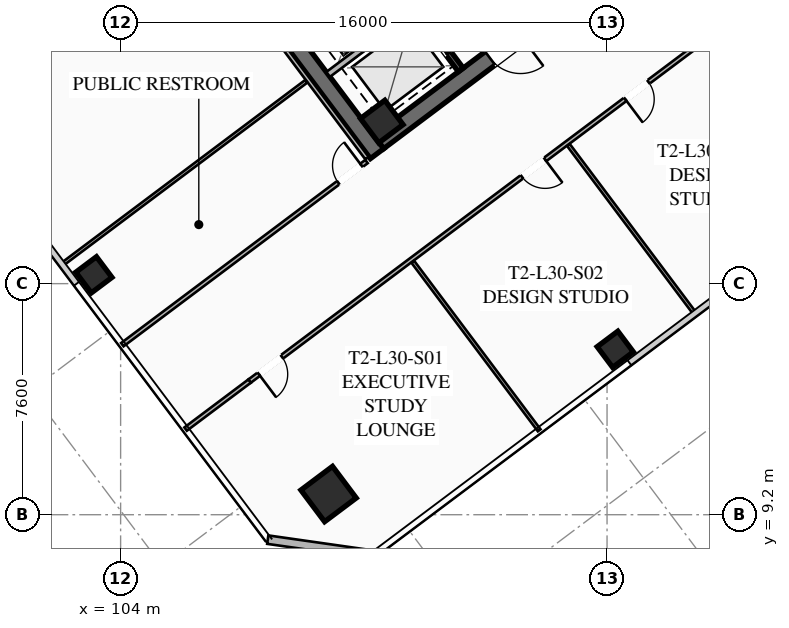
"""IFC4 building model, lengths in metres.
Left out: names, types, materials, properties, quantities, classifications, styles, units other than length and angle.
Written with IfcOpenShell. Run it as: python <this file> out.ifc"""

import sys

from ifc_helpers import new_model, si_unit, direction, frame, frame_2d, origin, origin_2d, place, context, subcontext, project, spatial, rectangle, hollow_rectangle, extrude, element, fill, save


model = new_model("IFC4")
c1 = context("Model", 3, precision=1e-05, world=origin(), true_north=direction((0.0, 1.0)))
c2 = subcontext(c1, "Body", "Model", "MODEL_VIEW")
j1 = project(units=[si_unit("LENGTHUNIT", "METRE"), si_unit("PLANEANGLEUNIT", "RADIAN")], contexts=[c1])
p1 = place(None, origin())
s1 = spatial("IfcSite", under=j1, at=p1, CompositionType="ELEMENT")
p2 = place(p1, origin())
s2 = spatial("IfcBuilding", under=s1, at=p2, CompositionType="ELEMENT")
p3 = place(p2, frame((0.0, 0.0, 114.4)))
s3 = spatial("IfcBuildingStorey", under=s2, at=p3, CompositionType="ELEMENT", Elevation=114.4)
p4 = place(p3, frame((112.436, 21.077, 0.0), z_axis=(0.0, 0.0, 1.0), x_axis=(-0.600005007985, 0.799996243986, 0.0)))
e1 = element("IfcWall", 1, at=p4, inside=s3, PredefinedType="SHEAR", context=c2, shape_type="SweptSolid", body=[
    extrude(rectangle(XDim=15.6, YDim=0.55, at=frame_2d((7.8, 0.0))), origin(), (0.0, 0.0, 1.0), 3.55),
])
p5 = place(p3, frame((124.539, 30.498, 0.0), z_axis=(0.0, 0.0, 1.0), x_axis=(-0.799998054672, -0.600002593761, 0.0)))
e2 = element("IfcWall", 2, at=p5, inside=s3, PredefinedType="SHEAR", context=c2, shape_type="SweptSolid", body=[
    extrude(rectangle(XDim=15.06, YDim=0.55, at=frame_2d((7.53, 0.0))), origin(), (0.0, 0.0, 1.0), 3.55),
])
p6 = place(p5, frame((9.23, 0.0, 0.0)))
e3 = element("IfcOpeningElement", 3, at=p6, cuts=e2, PredefinedType="OPENING", context=c2, shape_type="SweptSolid", body=[
    extrude(rectangle(XDim=1.25, YDim=2.25, at=frame_2d((0.625, 1.125))), frame((0.0, 0.285, 0.0), z_axis=(0.0, -1.0, 0.0), x_axis=(1.0, 0.0, 0.0)), (0.0, 0.0, 1.0), 0.57),
])
p7 = place(p5, frame((4.18, 0.0, 0.0)))
e4 = element("IfcOpeningElement", 4, at=p7, cuts=e2, PredefinedType="OPENING", context=c2, shape_type="SweptSolid", body=[
    extrude(rectangle(XDim=1.25, YDim=2.25, at=frame_2d((0.625, 1.125))), frame((0.0, 0.285, 0.0), z_axis=(0.0, -1.0, 0.0), x_axis=(1.0, 0.0, 0.0)), (0.0, 0.0, 1.0), 0.57),
])
p8 = place(p3, frame((112.59, 22.13, 0.0), z_axis=(0.0, 0.0, 1.0), x_axis=(0.799999996291, 0.600000004945, 0.0)))
e5 = element("IfcColumn", 5, at=p8, inside=s3, PredefinedType="COLUMN", context=c2, shape_type="SweptSolid", body=[
    extrude(hollow_rectangle(XDim=1.0, YDim=1.0, WallThickness=0.04, at=origin_2d()), origin(), (0.0, 0.0, 1.0), 3.37),
])
p9 = place(p3, frame((110.84, 9.88, 0.0), z_axis=(0.0, 0.0, 1.0), x_axis=(0.799999996291, 0.600000004945, 0.0)))
e6 = element("IfcColumn", 6, at=p9, inside=s3, PredefinedType="COLUMN", context=c2, shape_type="SweptSolid", body=[
    extrude(hollow_rectangle(XDim=1.3, YDim=1.3, WallThickness=0.05, at=origin_2d()), origin(), (0.0, 0.0, 1.0), 3.37),
])
for number, where, z_axis, x_axis in (
    (7, (120.27, 14.64, 0.0), (0.0, 0.0, 1.0), (0.8, 0.6, 0.0)),
    (8, (103.12, 17.09, 0.0), (0.0, 0.0, 1.0), (0.8, 0.6, 0.0)),
):
    element("IfcColumn", number, at=place(p3, frame(where, z_axis=z_axis, x_axis=x_axis)), inside=s3, PredefinedType="COLUMN", context=c2, shape_type="SweptSolid", body=[
        extrude(hollow_rectangle(XDim=0.85, YDim=0.85, WallThickness=0.035, at=origin_2d()), origin(), (0.0, 0.0, 1.0), 3.37),
    ])
p10 = place(p3, frame((112.34, 7.88, 0.0), z_axis=(0.0, 0.0, 1.0), x_axis=(-0.989949493661, 0.141421356237, 0.0)))
e9 = element("IfcWall", 9, at=p10, inside=s3, PredefinedType="SOLIDWALL", context=c2, shape_type="SweptSolid", body=[
    extrude(rectangle(XDim=3.536, YDim=0.28, at=frame_2d((1.768, 0.0))), origin(), (0.0, 0.0, 1.0), 3.37),
])
p11 = place(p3, frame((115.19, 23.83, 0.0), z_axis=(0.0, 0.0, 1.0), x_axis=(-0.599993943644, 0.800004542231, 0.0)))
e10 = element("IfcWall", 10, at=p11, inside=s3, PredefinedType="SHEAR", context=c2, shape_type="SweptSolid", body=[
    extrude(rectangle(XDim=6.45, YDim=0.2, at=frame_2d((3.225, 0.0))), origin(), (0.0, 0.0, 1.0), 3.37),
])
p12 = place(p11, frame((4.875, 0.0, 0.0)))
e11 = element("IfcOpeningElement", 11, at=p12, cuts=e10, PredefinedType="OPENING", context=c2, shape_type="SweptSolid", body=[
    extrude(rectangle(XDim=1.3, YDim=2.25, at=frame_2d((0.65, 1.125))), frame((0.0, 0.11, 0.0), z_axis=(0.0, -1.0, 0.0), x_axis=(1.0, 0.0, 0.0)), (0.0, 0.0, 1.0), 0.22),
])
p13 = place(p11, frame((2.875, 0.0, 0.0)))
e12 = element("IfcOpeningElement", 12, at=p13, cuts=e10, PredefinedType="OPENING", context=c2, shape_type="SweptSolid", body=[
    extrude(rectangle(XDim=1.3, YDim=2.25, at=frame_2d((0.65, 1.125))), frame((0.0, 0.11, 0.0), z_axis=(0.0, -1.0, 0.0), x_axis=(1.0, 0.0, 0.0)), (0.0, 0.0, 1.0), 0.22),
])
p14 = place(p11, frame((0.675, 0.0, 0.0)))
e13 = element("IfcOpeningElement", 13, at=p14, cuts=e10, PredefinedType="OPENING", context=c2, shape_type="SweptSolid", body=[
    extrude(rectangle(XDim=1.3, YDim=2.25, at=frame_2d((0.65, 1.125))), frame((0.0, 0.11, 0.0), z_axis=(0.0, -1.0, 0.0), x_axis=(1.0, 0.0, 0.0)), (0.0, 0.0, 1.0), 0.22),
])
p15 = place(p3, frame((110.826, 23.682, 0.0), z_axis=(0.0, 0.0, 1.0), x_axis=(0.8, 0.6, 0.0)))
e14 = element("IfcWall", 14, at=p15, inside=s3, PredefinedType="SOLIDWALL", context=c2, shape_type="SweptSolid", body=[
    extrude(rectangle(XDim=3.48, YDim=0.2, at=frame_2d((1.74, 0.0))), origin(), (0.0, 0.0, 1.0), 3.37),
])
p16 = place(p3, frame((133.282, 32.374, 0.0), z_axis=(0.0, 0.0, 1.0), x_axis=(-0.8, -0.6, 0.0)))
e15 = element("IfcWall", 15, at=p16, inside=s3, PredefinedType="PARTITIONING", context=c2, shape_type="SweptSolid", body=[
    extrude(rectangle(XDim=31.3, YDim=0.135, at=frame_2d((15.65, 0.0))), origin(), (0.0, 0.0, 1.0), 2.723),
])
p17 = place(p16, frame((29.97, 0.0, 0.0)))
e16 = element("IfcOpeningElement", 16, at=p17, cuts=e15, PredefinedType="OPENING", context=c2, shape_type="SweptSolid", body=[
    extrude(rectangle(XDim=0.95, YDim=2.05, at=frame_2d((0.475, 1.025))), frame((0.0, 0.077, 0.0), z_axis=(0.0, -1.0, 0.0), x_axis=(1.0, 0.0, 0.0)), (0.0, 0.0, 1.0), 0.155),
])
p18 = place(p16, frame((19.151, 0.0, 0.0)))
e17 = element("IfcOpeningElement", 17, at=p18, cuts=e15, PredefinedType="OPENING", context=c2, shape_type="SweptSolid", body=[
    extrude(rectangle(XDim=0.95, YDim=2.05, at=frame_2d((0.475, 1.025))), frame((0.0, 0.077, 0.0), z_axis=(0.0, -1.0, 0.0), x_axis=(1.0, 0.0, 0.0)), (0.0, 0.0, 1.0), 0.155),
])
p19 = place(p16, frame((14.901, 0.0, 0.0)))
e18 = element("IfcOpeningElement", 18, at=p19, cuts=e15, PredefinedType="OPENING", context=c2, shape_type="SweptSolid", body=[
    extrude(rectangle(XDim=0.95, YDim=2.05, at=frame_2d((0.475, 1.025))), frame((0.0, 0.077, 0.0), z_axis=(0.0, -1.0, 0.0), x_axis=(1.0, 0.0, 0.0)), (0.0, 0.0, 1.0), 0.155),
])
p20 = place(p16, frame((10.92, 0.0, 0.0)))
e19 = element("IfcOpeningElement", 19, at=p20, cuts=e15, PredefinedType="OPENING", context=c2, shape_type="SweptSolid", body=[
    extrude(rectangle(XDim=0.95, YDim=2.05, at=frame_2d((0.475, 1.025))), frame((0.0, 0.077, 0.0), z_axis=(0.0, -1.0, 0.0), x_axis=(1.0, 0.0, 0.0)), (0.0, 0.0, 1.0), 0.155),
])
p21 = place(p16, frame((0.38, 0.0, 0.0)))
e20 = element("IfcOpeningElement", 20, at=p21, cuts=e15, PredefinedType="OPENING", context=c2, shape_type="SweptSolid", body=[
    extrude(rectangle(XDim=0.95, YDim=2.05, at=frame_2d((0.475, 1.025))), frame((0.0, 0.077, 0.0), z_axis=(0.0, -1.0, 0.0), x_axis=(1.0, 0.0, 0.0)), (0.0, 0.0, 1.0), 0.155),
])
p22 = place(p3, frame((106.138, 12.016, 0.0), z_axis=(0.0, 0.0, 1.0), x_axis=(0.80002227902, 0.599970293491, 0.0)))
e21 = element("IfcWall", 21, at=p22, inside=s3, PredefinedType="PARTITIONING", context=c2, shape_type="SweptSolid", body=[
    extrude(rectangle(XDim=2.63, YDim=0.135, at=frame_2d((1.315, 0.0))), origin(), (0.0, 0.0, 1.0), 2.723),
])
p23 = place(p3, frame((117.768, 11.976, 0.0), z_axis=(0.0, 0.0, 1.0), x_axis=(-0.6, 0.8, 0.0)))
e22 = element("IfcWall", 22, at=p23, inside=s3, PredefinedType="PARTITIONING", context=c2, shape_type="SweptSolid", body=[
    extrude(rectangle(XDim=6.93, YDim=0.11, at=frame_2d((3.465, 0.0))), origin(), (0.0, 0.0, 1.0), 2.723),
])
p24 = place(p3, frame((122.888, 15.816, 0.0), z_axis=(0.0, 0.0, 1.0), x_axis=(-0.599983090003, 0.800012682219, 0.0)))
e23 = element("IfcWall", 23, at=p24, inside=s3, PredefinedType="PARTITIONING", context=c2, shape_type="SweptSolid", body=[
    extrude(rectangle(XDim=6.93, YDim=0.11, at=frame_2d((3.465, 0.0))), origin(), (0.0, 0.0, 1.0), 2.723),
])
p25 = place(p3, frame((112.104, 20.928, 0.0), z_axis=(0.0, 0.0, 1.0), x_axis=(-0.599994940075, 0.800003794918, 0.0)))
e24 = element("IfcWall", 24, at=p25, inside=s3, PredefinedType="PARTITIONING", context=c2, shape_type="SweptSolid", body=[
    extrude(rectangle(XDim=15.44, YDim=0.135, at=frame_2d((7.72, 0.0))), origin(), (0.0, 0.0, 1.0), 2.723),
])
p26 = place(p3, frame((104.056, 14.792, 0.0), z_axis=(0.0, 0.0, 1.0), x_axis=(0.800002918023, 0.599996109283, 0.0)))
e25 = element("IfcWall", 25, at=p26, inside=s3, PredefinedType="PARTITIONING", context=c2, shape_type="SweptSolid", body=[
    extrude(rectangle(XDim=10.04, YDim=0.135, at=frame_2d((5.02, 0.0))), origin(), (0.0, 0.0, 1.0), 2.723),
])
p27 = place(p26, frame((8.88, 0.0, 0.0)))
e26 = element("IfcOpeningElement", 26, at=p27, cuts=e25, PredefinedType="OPENING", context=c2, shape_type="SweptSolid", body=[
    extrude(rectangle(XDim=0.95, YDim=2.05, at=frame_2d((0.475, 1.025))), frame((0.0, 0.077, 0.0), z_axis=(0.0, -1.0, 0.0), x_axis=(1.0, 0.0, 0.0)), (0.0, 0.0, 1.0), 0.155),
])
p28 = place(p3, frame((102.076, 17.432, 0.0), z_axis=(0.0, 0.0, 1.0), x_axis=(0.799991245945, 0.600011671896, 0.0)))
e27 = element("IfcWall", 27, at=p28, inside=s3, PredefinedType="PARTITIONING", context=c2, shape_type="SweptSolid", body=[
    extrude(rectangle(XDim=10.04, YDim=0.11, at=frame_2d((5.02, 0.0))), origin(), (0.0, 0.0, 1.0), 2.723),
])
p29 = place(p6, origin())
e28 = element("IfcDoor", 28, at=p29, inside=s3, OperationType="SINGLE_SWING_LEFT", PredefinedType="DOOR", context=c2, shape_type="SweptSolid", body=[
    extrude(rectangle(XDim=1.25, YDim=2.25, at=frame_2d((0.625, 1.125))), frame((0.0, 0.025, 0.0), z_axis=(0.0, -1.0, 0.0), x_axis=(1.0, 0.0, 0.0)), (0.0, 0.0, 1.0), 0.05),
])
fill(e3, e28)
p30 = place(p17, origin())
e29 = element("IfcDoor", 29, at=p30, inside=s3, OperationType="SINGLE_SWING_RIGHT", PredefinedType="DOOR", context=c2, shape_type="SweptSolid", body=[
    extrude(rectangle(XDim=0.95, YDim=2.05, at=frame_2d((0.475, 1.025))), frame((0.0, 0.025, 0.0), z_axis=(0.0, -1.0, 0.0), x_axis=(1.0, 0.0, 0.0)), (0.0, 0.0, 1.0), 0.05),
])
fill(e16, e29)
p31 = place(p18, origin())
e30 = element("IfcDoor", 30, at=p31, inside=s3, OperationType="SINGLE_SWING_LEFT", PredefinedType="DOOR", context=c2, shape_type="SweptSolid", body=[
    extrude(rectangle(XDim=0.95, YDim=2.05, at=frame_2d((0.475, 1.025))), frame((0.0, 0.025, 0.0), z_axis=(0.0, -1.0, 0.0), x_axis=(1.0, 0.0, 0.0)), (0.0, 0.0, 1.0), 0.05),
])
fill(e17, e30)
p32 = place(p19, origin())
e31 = element("IfcDoor", 31, at=p32, inside=s3, OperationType="SINGLE_SWING_RIGHT", PredefinedType="DOOR", context=c2, shape_type="SweptSolid", body=[
    extrude(rectangle(XDim=0.95, YDim=2.05, at=frame_2d((0.475, 1.025))), frame((0.0, 0.025, 0.0), z_axis=(0.0, -1.0, 0.0), x_axis=(1.0, 0.0, 0.0)), (0.0, 0.0, 1.0), 0.05),
])
fill(e18, e31)
p33 = place(p27, origin())
e32 = element("IfcDoor", 32, at=p33, inside=s3, OperationType="SINGLE_SWING_RIGHT", PredefinedType="DOOR", context=c2, shape_type="SweptSolid", body=[
    extrude(rectangle(XDim=0.95, YDim=2.05, at=frame_2d((0.475, 1.025))), frame((0.0, 0.025, 0.0), z_axis=(0.0, -1.0, 0.0), x_axis=(1.0, 0.0, 0.0)), (0.0, 0.0, 1.0), 0.05),
])
fill(e26, e32)
p34 = place(p14, origin())
e33 = element("IfcDoor", 33, at=p34, inside=s3, OperationType="SLIDING_TO_LEFT", PredefinedType="DOOR", context=c2, shape_type="SweptSolid", body=[
    extrude(rectangle(XDim=1.3, YDim=2.25, at=frame_2d((0.65, 1.125))), frame((0.0, 0.025, 0.0), z_axis=(0.0, -1.0, 0.0), x_axis=(1.0, 0.0, 0.0)), (0.0, 0.0, 1.0), 0.05),
])
fill(e13, e33)
save(model, sys.argv[1])
